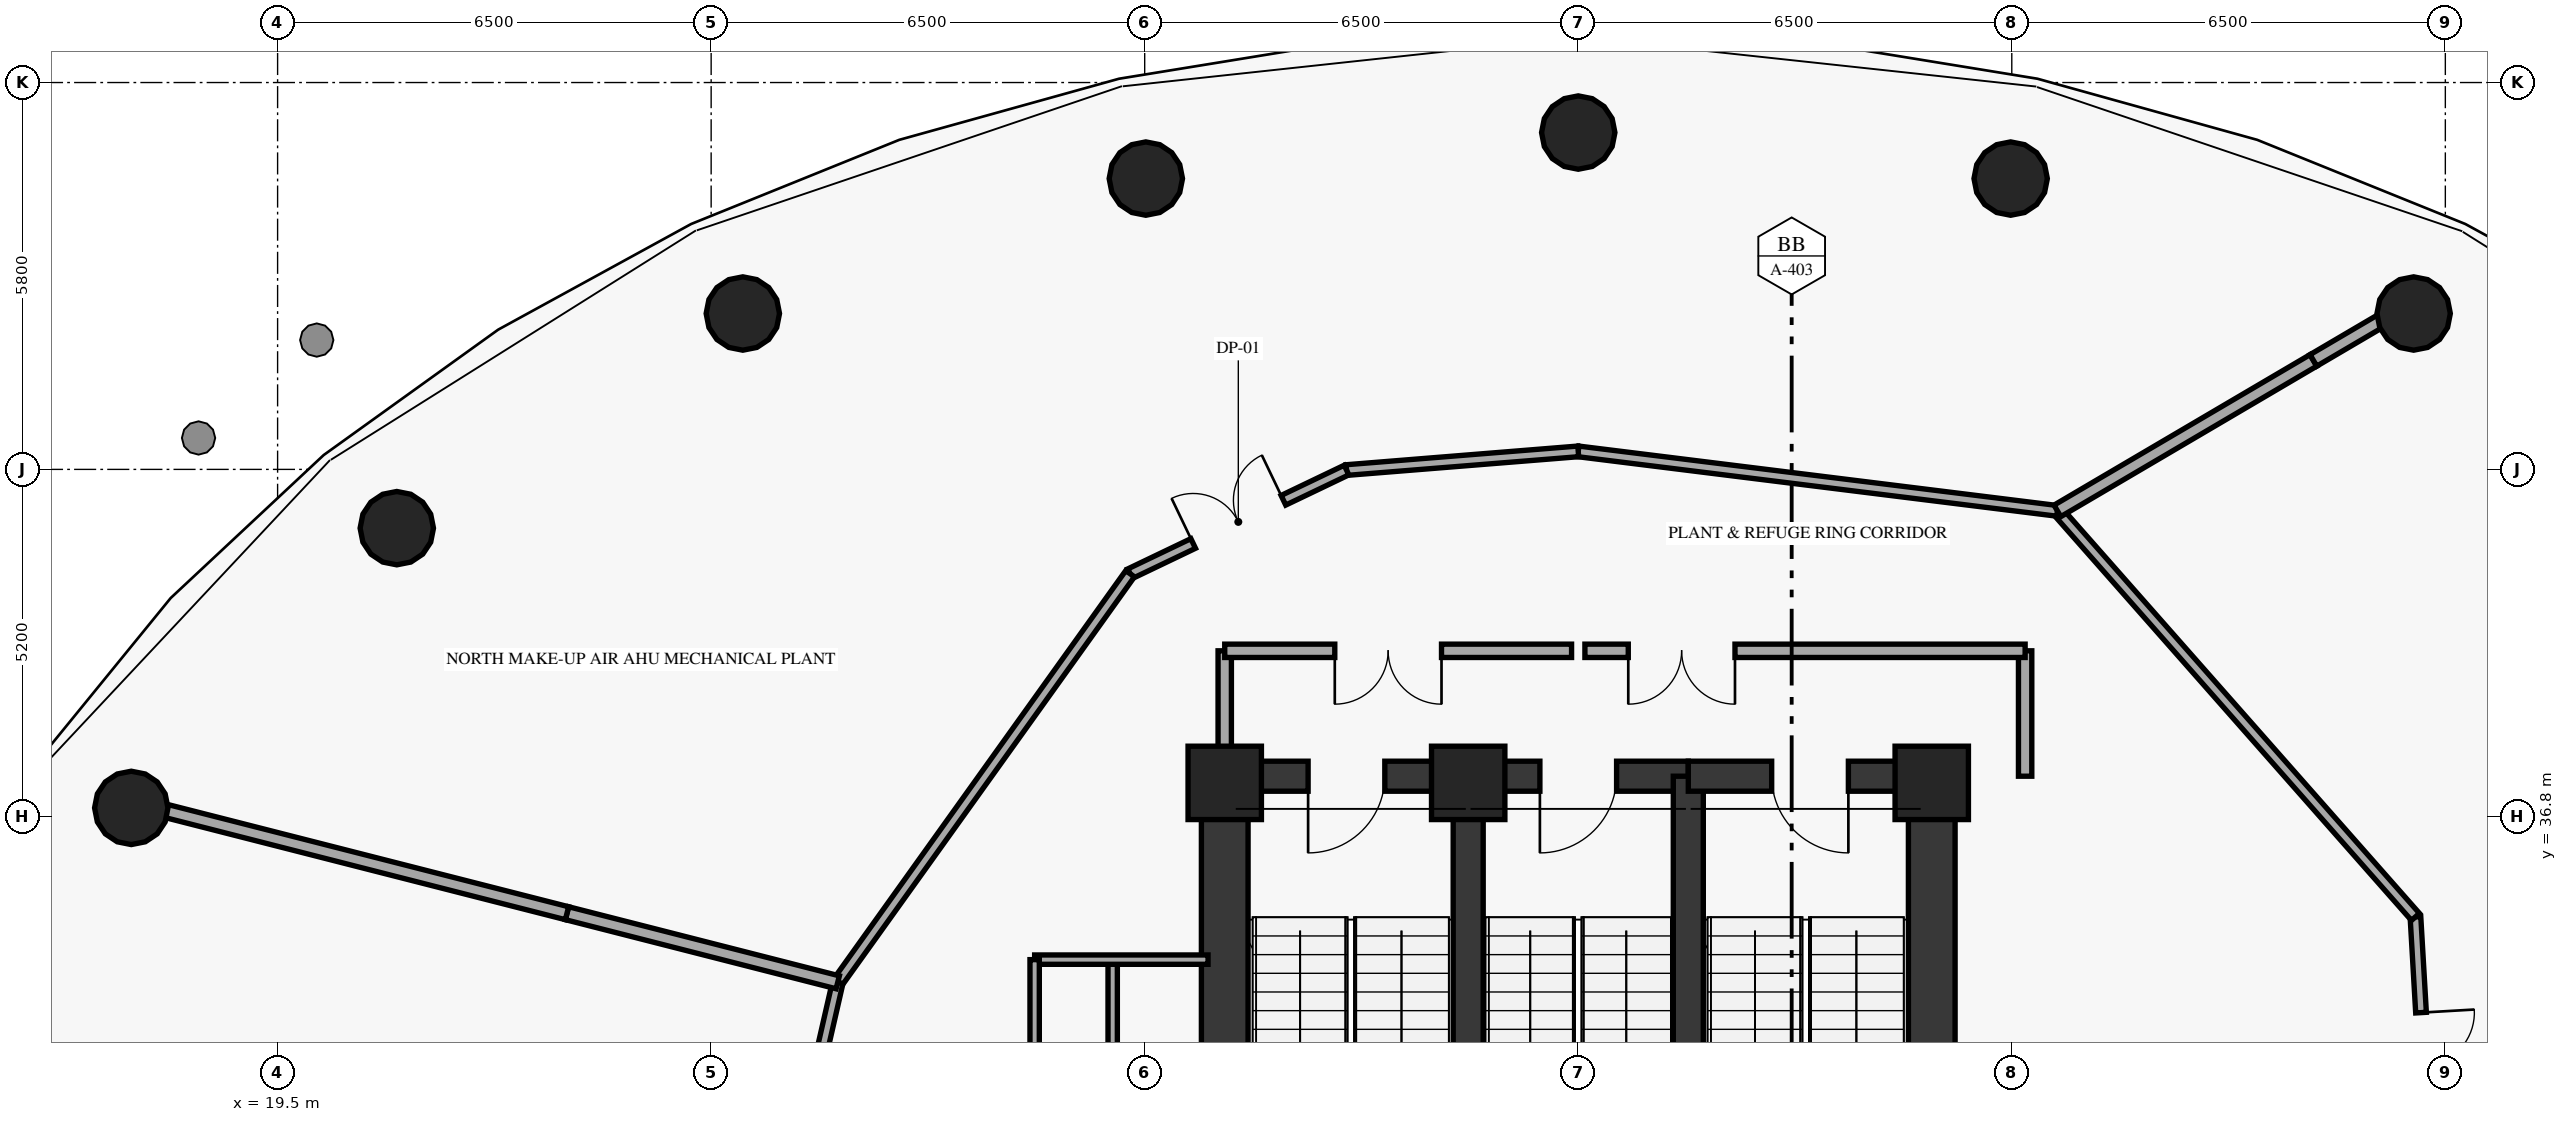
"""IFC4 building model, lengths in metres.
Left out: names, types, materials, properties, quantities, classifications, styles, units other than length and angle.
Written with IfcOpenShell. Run it as: python <this file> out.ifc"""

import sys

from ifc_helpers import new_model, si_unit, direction, frame, frame_2d, origin, origin_2d, place, context, subcontext, project, spatial, rectangle, circle, extrude, element, fill, save


model = new_model("IFC4")
c1 = context("Model", 3, precision=1e-05, world=origin(), true_north=direction((0.0, 1.0)))
c2 = subcontext(c1, "Body", "Model", "MODEL_VIEW")
j1 = project(units=[si_unit("LENGTHUNIT", "METRE"), si_unit("PLANEANGLEUNIT", "RADIAN")], contexts=[c1])
p1 = place(None, origin())
s1 = spatial("IfcSite", under=j1, at=p1, CompositionType="ELEMENT")
p2 = place(p1, origin())
s2 = spatial("IfcBuilding", under=s1, at=p2, CompositionType="ELEMENT")
p3 = place(p2, frame((0.0, 0.0, 106.05)))
s3 = spatial("IfcBuildingStorey", under=s2, at=p3, CompositionType="ELEMENT", Elevation=106.05)
for number, where, z_axis, x_axis in (
    (1, (44.3, 37.3, 0.0), (0.0, 0.0, 1.0), (1.0, 0.0, 0.0)),
    (2, (37.35, 37.3, 0.0), (0.0, 0.0, 1.0), (1.0, 0.0, 0.0)),
    (3, (33.7, 37.3, 0.0), (0.0, 0.0, 1.0), (1.0, 0.0, 0.0)),
):
    element("IfcColumn", number, at=place(p3, frame(where, z_axis=z_axis, x_axis=x_axis)), inside=s3, PredefinedType="PILASTER", context=c2, shape_type="SweptSolid", body=[
        extrude(rectangle(XDim=1.1, YDim=1.1, at=origin_2d()), origin(), (0.0, 0.0, 1.0), 6.88),
    ])
for number, where, z_axis, x_axis in (
    (4, (51.525, 44.337, 0.0), (0.0, 0.0, 1.0), (1.0, 0.0, 0.0)),
    (5, (45.483, 46.36, 0.0), (0.0, 0.0, 1.0), (1.0, 0.0, 0.0)),
    (6, (39.0, 47.05, 0.0), (0.0, 0.0, 1.0), (1.0, 0.0, 0.0)),
    (7, (32.517, 46.36, 0.0), (0.0, 0.0, 1.0), (1.0, 0.0, 0.0)),
    (8, (26.475, 44.337, 0.0), (0.0, 0.0, 1.0), (1.0, 0.0, 0.0)),
    (9, (21.287, 41.119, 0.0), (0.0, 0.0, 1.0), (1.0, 0.0, 0.0)),
    (10, (17.306, 36.925, 0.0), (0.0, 0.0, 1.0), (1.0, 0.0, 0.0)),
):
    element("IfcColumn", number, at=place(p3, frame(where, z_axis=z_axis, x_axis=x_axis)), inside=s3, PredefinedType="COLUMN", context=c2, shape_type="SweptSolid", body=[
        extrude(circle(Radius=0.55, at=origin_2d()), origin(), (0.0, 0.0, 1.0), 6.88),
    ])
for number, where, z_axis, x_axis in (
    (11, (33.7, 29.05, 0.0), (0.0, 0.0, 1.0), (0.0, 1.0, 0.0)),
    (12, (44.3, 29.05, 0.0), (0.0, 0.0, 1.0), (0.0, 1.0, 0.0)),
):
    element("IfcWall", number, at=place(p3, frame(where, z_axis=z_axis, x_axis=x_axis)), inside=s3, PredefinedType="SHEAR", context=c2, shape_type="SweptSolid", body=[
        extrude(rectangle(XDim=8.35, YDim=0.7, at=frame_2d((4.175, 0.0))), origin(), (0.0, 0.0, 1.0), 6.88),
    ])
p4 = place(p3, frame((37.35, 37.4, 0.0), z_axis=(0.0, 0.0, 1.0), x_axis=(-1.0, 0.0, 0.0)))
e13 = element("IfcWall", 13, at=p4, inside=s3, PredefinedType="SHEAR", context=c2, shape_type="SweptSolid", body=[
    extrude(rectangle(XDim=3.65, YDim=0.45, at=frame_2d((1.825, 0.0))), origin(), (0.0, 0.0, 1.0), 6.88),
])
p5 = place(p4, frame((1.25, 0.0, 0.0)))
e14 = element("IfcOpeningElement", 14, at=p5, cuts=e13, PredefinedType="OPENING", context=c2, shape_type="SweptSolid", body=[
    extrude(rectangle(XDim=1.15, YDim=2.15, at=frame_2d((0.575, 1.075))), frame((0.0, 0.235, 0.0), z_axis=(0.0, -1.0, 0.0), x_axis=(1.0, 0.0, 0.0)), (0.0, 0.0, 1.0), 0.47),
])
p6 = place(p3, frame((37.35, 29.05, 0.0), z_axis=(0.0, 0.0, 1.0), x_axis=(0.0, 1.0, 0.0)))
e15 = element("IfcWall", 15, at=p6, inside=s3, PredefinedType="SHEAR", context=c2, shape_type="SweptSolid", body=[
    extrude(rectangle(XDim=8.35, YDim=0.45, at=frame_2d((4.175, 0.0))), origin(), (0.0, 0.0, 1.0), 6.88),
])
p7 = place(p3, frame((40.65, 37.4, 0.0), z_axis=(0.0, 0.0, 1.0), x_axis=(-1.0, 0.0, 0.0)))
e16 = element("IfcWall", 16, at=p7, inside=s3, PredefinedType="SHEAR", context=c2, shape_type="SweptSolid", body=[
    extrude(rectangle(XDim=3.3, YDim=0.45, at=frame_2d((1.65, 0.0))), origin(), (0.0, 0.0, 1.0), 6.88),
])
p8 = place(p7, frame((1.075, 0.0, 0.0)))
e17 = element("IfcOpeningElement", 17, at=p8, cuts=e16, PredefinedType="OPENING", context=c2, shape_type="SweptSolid", body=[
    extrude(rectangle(XDim=1.15, YDim=2.15, at=frame_2d((0.575, 1.075))), frame((0.0, 0.235, 0.0), z_axis=(0.0, -1.0, 0.0), x_axis=(1.0, 0.0, 0.0)), (0.0, 0.0, 1.0), 0.47),
])
p9 = place(p3, frame((40.65, 29.05, 0.0), z_axis=(0.0, 0.0, 1.0), x_axis=(0.0, 1.0, 0.0)))
e18 = element("IfcWall", 18, at=p9, inside=s3, PredefinedType="SHEAR", context=c2, shape_type="SweptSolid", body=[
    extrude(rectangle(XDim=8.35, YDim=0.45, at=frame_2d((4.175, 0.0))), origin(), (0.0, 0.0, 1.0), 6.88),
])
p10 = place(p3, frame((44.3, 37.4, 0.0), z_axis=(0.0, 0.0, 1.0), x_axis=(-1.0, 0.0, 0.0)))
e19 = element("IfcWall", 19, at=p10, inside=s3, PredefinedType="SHEAR", context=c2, shape_type="SweptSolid", body=[
    extrude(rectangle(XDim=3.65, YDim=0.45, at=frame_2d((1.825, 0.0))), origin(), (0.0, 0.0, 1.0), 6.88),
])
p11 = place(p10, frame((1.25, 0.0, 0.0)))
e20 = element("IfcOpeningElement", 20, at=p11, cuts=e19, PredefinedType="OPENING", context=c2, shape_type="SweptSolid", body=[
    extrude(rectangle(XDim=1.15, YDim=2.15, at=frame_2d((0.575, 1.075))), frame((0.0, 0.235, 0.0), z_axis=(0.0, -1.0, 0.0), x_axis=(1.0, 0.0, 0.0)), (0.0, 0.0, 1.0), 0.47),
])
for number, where, z_axis, x_axis in (
    (21, (33.7, 37.4, 0.0), (0.0, 0.0, 1.0), (0.0, 1.0, 0.0)),
    (22, (45.7, 37.4, 0.0), (0.0, 0.0, 1.0), (0.0, 1.0, 0.0)),
):
    element("IfcWall", number, at=place(p3, frame(where, z_axis=z_axis, x_axis=x_axis)), inside=s3, PredefinedType="SOLIDWALL", context=c2, shape_type="SweptSolid", body=[
        extrude(rectangle(XDim=1.88, YDim=0.2, at=frame_2d((0.94, 0.0))), origin(), (0.0, 0.0, 1.0), 6.88),
    ])
p12 = place(p3, frame((38.9, 39.28, 0.0), z_axis=(0.0, 0.0, 1.0), x_axis=(-1.0, 0.0, 0.0)))
e23 = element("IfcWall", 23, at=p12, inside=s3, PredefinedType="SOLIDWALL", context=c2, shape_type="SweptSolid", body=[
    extrude(rectangle(XDim=5.2, YDim=0.2, at=frame_2d((2.6, 0.0))), origin(), (0.0, 0.0, 1.0), 6.88),
])
p13 = place(p12, frame((1.95, 0.0, 0.0)))
e24 = element("IfcOpeningElement", 24, at=p13, cuts=e23, PredefinedType="OPENING", context=c2, shape_type="SweptSolid", body=[
    extrude(rectangle(XDim=1.6, YDim=2.2, at=frame_2d((0.8, 1.1))), frame((0.0, 0.11, 0.0), z_axis=(0.0, -1.0, 0.0), x_axis=(1.0, 0.0, 0.0)), (0.0, 0.0, 1.0), 0.22),
])
p14 = place(p3, frame((45.7, 39.28, 0.0), z_axis=(0.0, 0.0, 1.0), x_axis=(-1.0, 0.0, 0.0)))
e25 = element("IfcWall", 25, at=p14, inside=s3, PredefinedType="SOLIDWALL", context=c2, shape_type="SweptSolid", body=[
    extrude(rectangle(XDim=6.6, YDim=0.2, at=frame_2d((3.3, 0.0))), origin(), (0.0, 0.0, 1.0), 6.88),
])
p15 = place(p14, frame((4.35, 0.0, 0.0)))
e26 = element("IfcOpeningElement", 26, at=p15, cuts=e25, PredefinedType="OPENING", context=c2, shape_type="SweptSolid", body=[
    extrude(rectangle(XDim=1.6, YDim=2.2, at=frame_2d((0.8, 1.1))), frame((0.0, 0.11, 0.0), z_axis=(0.0, -1.0, 0.0), x_axis=(1.0, 0.0, 0.0)), (0.0, 0.0, 1.0), 0.22),
])
p16 = place(p3, frame((32.02, 29.05, 0.0), z_axis=(0.0, 0.0, 1.0), x_axis=(0.0, 1.0, 0.0)))
e27 = element("IfcWall", 27, at=p16, inside=s3, PredefinedType="PARTITIONING", context=c2, shape_type="SweptSolid", body=[
    extrude(rectangle(XDim=5.6, YDim=0.14, at=frame_2d((2.8, 0.0))), origin(), (0.0, 0.0, 1.0), 6.88),
])
p17 = place(p3, frame((30.85, 34.65, 0.0), z_axis=(0.0, 0.0, 1.0), x_axis=(1.0, 0.0, 0.0)))
e28 = element("IfcWall", 28, at=p17, inside=s3, PredefinedType="PARTITIONING", context=c2, shape_type="SweptSolid", body=[
    extrude(rectangle(XDim=2.6, YDim=0.14, at=frame_2d((1.3, 0.0))), origin(), (0.0, 0.0, 1.0), 6.88),
])
p18 = place(p3, frame((30.85, 29.05, 0.0), z_axis=(0.0, 0.0, 1.0), x_axis=(0.0, 1.0, 0.0)))
e29 = element("IfcWall", 29, at=p18, inside=s3, PredefinedType="PARTITIONING", context=c2, shape_type="SweptSolid", body=[
    extrude(rectangle(XDim=5.6, YDim=0.14, at=frame_2d((2.8, 0.0))), origin(), (0.0, 0.0, 1.0), 6.88),
])
p19 = place(p3, frame((51.552, 35.291, 0.0), z_axis=(0.0, 0.0, 1.0), x_axis=(0.058082602913, -0.998311780577, 0.0)))
e30 = element("IfcWall", 30, at=p19, inside=s3, PredefinedType="PARTITIONING", context=c2, shape_type="SweptSolid", body=[
    extrude(rectangle(XDim=4.477, YDim=0.16, at=frame_2d((2.238, 0.0))), origin(), (0.0, 0.0, 1.0), 6.88),
])
p20 = place(p19, frame((1.438, 0.0, 0.0)))
e31 = element("IfcOpeningElement", 31, at=p20, cuts=e30, PredefinedType="OPENING", context=c2, shape_type="SweptSolid", body=[
    extrude(rectangle(XDim=1.6, YDim=2.2, at=frame_2d((0.8, 1.1))), frame((0.0, 0.09, 0.0), z_axis=(0.0, -1.0, 0.0), x_axis=(1.0, 0.0, 0.0)), (0.0, 0.0, 1.0), 0.18),
])
p21 = place(p3, frame((51.552, 35.291, 0.0), z_axis=(0.0, 0.0, 1.0), x_axis=(-0.661421630005, 0.750014284772, 0.0)))
e32 = element("IfcWall", 32, at=p21, inside=s3, PredefinedType="PARTITIONING", context=c2, shape_type="SweptSolid", body=[
    extrude(rectangle(XDim=8.116, YDim=0.16, at=frame_2d((4.058, 0.0))), origin(), (0.0, 0.0, 1.0), 6.88),
])
p22 = place(p3, frame((46.184, 41.378, 0.0), z_axis=(0.0, 0.0, 1.0), x_axis=(-0.992378204756, 0.12322945559, 0.0)))
e33 = element("IfcWall", 33, at=p22, inside=s3, PredefinedType="PARTITIONING", context=c2, shape_type="SweptSolid", body=[
    extrude(rectangle(XDim=7.239, YDim=0.16, at=frame_2d((3.62, 0.0))), origin(), (0.0, 0.0, 1.0), 6.88),
])
p23 = place(p3, frame((39.0, 42.27, 0.0), z_axis=(0.0, 0.0, 1.0), x_axis=(-0.99676721303, -0.080343780277, 0.0)))
e34 = element("IfcWall", 34, at=p23, inside=s3, PredefinedType="PARTITIONING", context=c2, shape_type="SweptSolid", body=[
    extrude(rectangle(XDim=3.485, YDim=0.16, at=frame_2d((1.743, 0.0))), origin(), (0.0, 0.0, 1.0), 6.88),
])
p24 = place(p3, frame((32.281, 40.436, 0.0), z_axis=(0.0, 0.0, 1.0), x_axis=(0.901911315708, 0.43192126435, 0.0)))
e35 = element("IfcWall", 35, at=p24, inside=s3, PredefinedType="PARTITIONING", context=c2, shape_type="SweptSolid", body=[
    extrude(rectangle(XDim=3.598, YDim=0.16, at=frame_2d((1.799, 0.0))), origin(), (0.0, 0.0, 1.0), 6.88),
])
p25 = place(p24, frame((1.049, 0.0, 0.0)))
e36 = element("IfcOpeningElement", 36, at=p25, cuts=e35, PredefinedType="OPENING", context=c2, shape_type="SweptSolid", body=[
    extrude(rectangle(XDim=1.5, YDim=2.2, at=frame_2d((0.75, 1.1))), frame((0.0, 0.09, 0.0), z_axis=(0.0, -1.0, 0.0), x_axis=(1.0, 0.0, 0.0)), (0.0, 0.0, 1.0), 0.18),
])
p26 = place(p3, frame((32.281, 40.436, 0.0), z_axis=(0.0, 0.0, 1.0), x_axis=(-0.581884927471, -0.813271130179, 0.0)))
e37 = element("IfcWall", 37, at=p26, inside=s3, PredefinedType="PARTITIONING", context=c2, shape_type="SweptSolid", body=[
    extrude(rectangle(XDim=7.532, YDim=0.16, at=frame_2d((3.766, 0.0))), origin(), (0.0, 0.0, 1.0), 6.88),
])
p27 = place(p3, frame((27.898, 34.31, 0.0), z_axis=(0.0, 0.0, 1.0), x_axis=(-0.223002916051, -0.974817777553, 0.0)))
e38 = element("IfcWall", 38, at=p27, inside=s3, PredefinedType="PARTITIONING", context=c2, shape_type="SweptSolid", body=[
    extrude(rectangle(XDim=7.704, YDim=0.16, at=frame_2d((3.852, 0.0))), origin(), (0.0, 0.0, 1.0), 6.88),
])
p28 = place(p3, frame((46.184, 41.378, 0.0), z_axis=(0.0, 0.0, 1.0), x_axis=(0.862079385068, 0.506773256833, 0.0)))
e39 = element("IfcWall", 39, at=p28, inside=s3, PredefinedType="SOLIDWALL", context=c2, shape_type="SweptSolid", body=[
    extrude(rectangle(XDim=4.452, YDim=0.2, at=frame_2d((2.226, 0.0))), origin(), (0.0, 0.0, 1.0), 6.88),
])
p29 = place(p3, frame((50.022, 43.634, 0.0), z_axis=(0.0, 0.0, 1.0), x_axis=(0.862175171179, 0.506610278421, 0.0)))
e40 = element("IfcWall", 40, at=p29, inside=s3, PredefinedType="SOLIDWALL", context=c2, shape_type="SweptSolid", body=[
    extrude(rectangle(XDim=1.927, YDim=0.2, at=frame_2d((0.963, 0.0))), origin(), (0.0, 0.0, 1.0), 5.43),
])
p30 = place(p3, frame((27.898, 34.31, 0.0), z_axis=(0.0, 0.0, 1.0), x_axis=(-0.968941187562, 0.247291275719, 0.0)))
e41 = element("IfcWall", 41, at=p30, inside=s3, PredefinedType="SOLIDWALL", context=c2, shape_type="SweptSolid", body=[
    extrude(rectangle(XDim=4.189, YDim=0.2, at=frame_2d((2.094, 0.0))), origin(), (0.0, 0.0, 1.0), 6.88),
])
p31 = place(p3, frame((23.839, 35.346, 0.0), z_axis=(0.0, 0.0, 1.0), x_axis=(-0.968974231147, 0.247161767619, 0.0)))
e42 = element("IfcWall", 42, at=p31, inside=s3, PredefinedType="SOLIDWALL", context=c2, shape_type="SweptSolid", body=[
    extrude(rectangle(XDim=7.024, YDim=0.2, at=frame_2d((3.512, 0.0))), origin(), (0.0, 0.0, 1.0), 5.23),
])
p32 = place(p5, origin())
e43 = element("IfcDoor", 43, at=p32, inside=s3, OperationType="SINGLE_SWING_RIGHT", PredefinedType="DOOR", context=c2, shape_type="SweptSolid", body=[
    extrude(rectangle(XDim=1.15, YDim=2.15, at=frame_2d((0.575, 1.075))), frame((0.0, 0.025, 0.0), z_axis=(0.0, -1.0, 0.0), x_axis=(1.0, 0.0, 0.0)), (0.0, 0.0, 1.0), 0.05),
])
fill(e14, e43)
p33 = place(p8, origin())
e44 = element("IfcDoor", 44, at=p33, inside=s3, OperationType="SINGLE_SWING_RIGHT", PredefinedType="DOOR", context=c2, shape_type="SweptSolid", body=[
    extrude(rectangle(XDim=1.15, YDim=2.15, at=frame_2d((0.575, 1.075))), frame((0.0, 0.025, 0.0), z_axis=(0.0, -1.0, 0.0), x_axis=(1.0, 0.0, 0.0)), (0.0, 0.0, 1.0), 0.05),
])
fill(e17, e44)
p34 = place(p11, origin())
e45 = element("IfcDoor", 45, at=p34, inside=s3, OperationType="SINGLE_SWING_LEFT", PredefinedType="DOOR", context=c2, shape_type="SweptSolid", body=[
    extrude(rectangle(XDim=1.15, YDim=2.15, at=frame_2d((0.575, 1.075))), frame((0.0, 0.025, 0.0), z_axis=(0.0, -1.0, 0.0), x_axis=(1.0, 0.0, 0.0)), (0.0, 0.0, 1.0), 0.05),
])
fill(e20, e45)
p35 = place(p13, origin())
e46 = element("IfcDoor", 46, at=p35, inside=s3, OperationType="DOUBLE_DOOR_SINGLE_SWING", PredefinedType="DOOR", context=c2, shape_type="SweptSolid", body=[
    extrude(rectangle(XDim=1.6, YDim=2.2, at=frame_2d((0.8, 1.1))), frame((0.0, 0.025, 0.0), z_axis=(0.0, -1.0, 0.0), x_axis=(1.0, 0.0, 0.0)), (0.0, 0.0, 1.0), 0.05),
])
fill(e24, e46)
p36 = place(p15, origin())
e47 = element("IfcDoor", 47, at=p36, inside=s3, OperationType="DOUBLE_DOOR_SINGLE_SWING", PredefinedType="DOOR", context=c2, shape_type="SweptSolid", body=[
    extrude(rectangle(XDim=1.6, YDim=2.2, at=frame_2d((0.8, 1.1))), frame((0.0, 0.025, 0.0), z_axis=(0.0, -1.0, 0.0), x_axis=(1.0, 0.0, 0.0)), (0.0, 0.0, 1.0), 0.05),
])
fill(e26, e47)
p37 = place(p20, origin())
e48 = element("IfcDoor", 48, at=p37, inside=s3, OperationType="DOUBLE_DOOR_SINGLE_SWING", PredefinedType="DOOR", context=c2, shape_type="SweptSolid", body=[
    extrude(rectangle(XDim=1.6, YDim=2.2, at=frame_2d((0.8, 1.1))), frame((0.0, 0.025, 0.0), z_axis=(0.0, -1.0, 0.0), x_axis=(1.0, 0.0, 0.0)), (0.0, 0.0, 1.0), 0.05),
])
fill(e31, e48)
p38 = place(p25, origin())
e49 = element("IfcDoor", 49, at=p38, inside=s3, OperationType="DOUBLE_DOOR_SINGLE_SWING", PredefinedType="DOOR", context=c2, shape_type="SweptSolid", body=[
    extrude(rectangle(XDim=1.5, YDim=2.2, at=frame_2d((0.75, 1.1))), frame((0.0, 0.025, 0.0), z_axis=(0.0, -1.0, 0.0), x_axis=(1.0, 0.0, 0.0)), (0.0, 0.0, 1.0), 0.05),
])
fill(e36, e49)
save(model, sys.argv[1])
